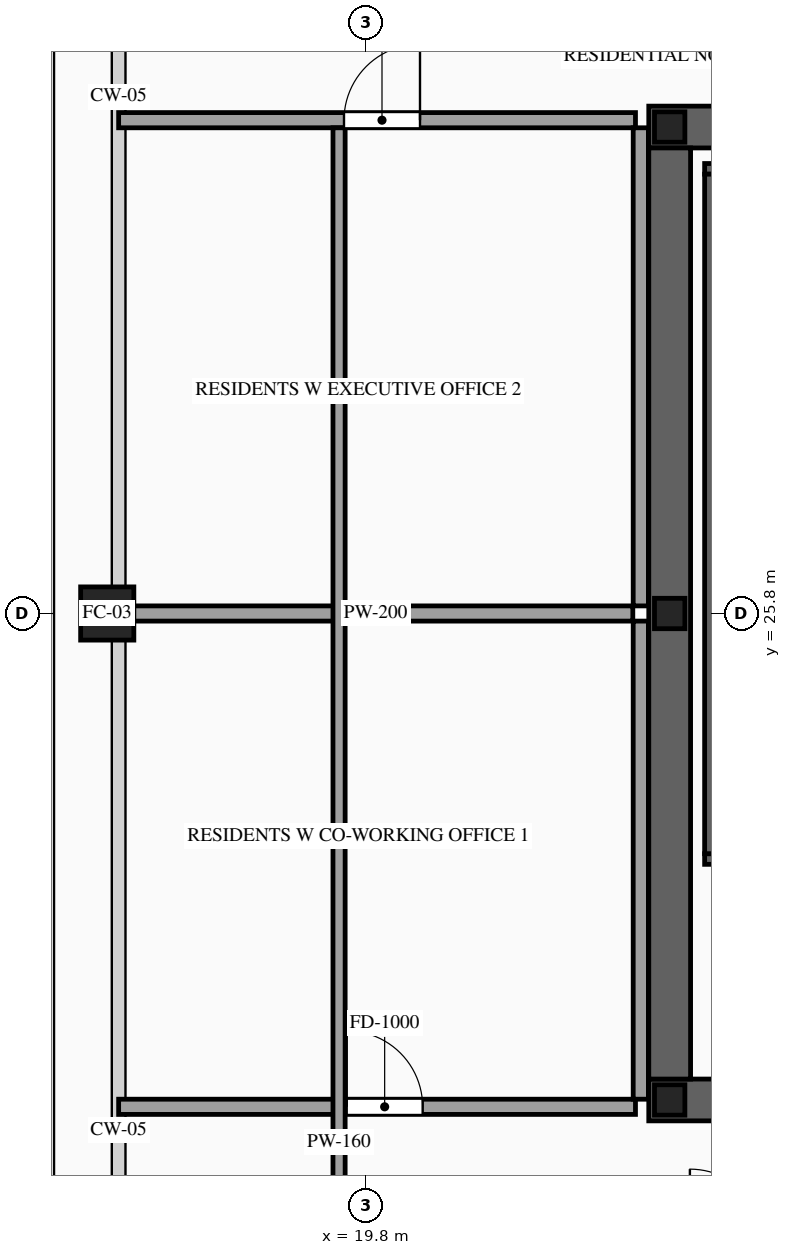
"""IFC4 building model, lengths in metres.
Left out: names, types, materials, properties, quantities, classifications, styles, units other than length and angle.
Written with IfcOpenShell. Run it as: python <this file> out.ifc"""

import sys

from ifc_helpers import new_model, si_unit, direction, frame, frame_2d, origin, origin_2d, place, context, subcontext, project, spatial, rectangle, hollow_rectangle, i_section, extrude, source, transform, mapped, element, fill, save


model = new_model("IFC4")
c1 = context("Model", 3, precision=1e-05, world=origin(), true_north=direction((0.0, 1.0)))
c2 = subcontext(c1, "Body", "Model", "MODEL_VIEW")
j1 = project(units=[si_unit("LENGTHUNIT", "METRE"), si_unit("PLANEANGLEUNIT", "RADIAN")], contexts=[c1])
p1 = place(None, origin())
s1 = spatial("IfcSite", under=j1, at=p1, CompositionType="ELEMENT")
p2 = place(p1, origin())
s2 = spatial("IfcBuilding", under=s1, at=p2, CompositionType="ELEMENT")
p3 = place(p2, frame((0.0, 0.0, 245.1)))
s3 = spatial("IfcBuildingStorey", under=s2, at=p3, CompositionType="ELEMENT", Elevation=245.1)
p4 = place(p3, frame((23.525, 19.4, 0.0), z_axis=(0.0, 0.0, 1.0), x_axis=(1.0, 0.0, 0.0)))
e1 = element("IfcWall", 1, at=p4, inside=s3, PredefinedType="SHEAR", context=c2, shape_type="SweptSolid", body=[
    extrude(rectangle(XDim=26.95, YDim=0.55, at=frame_2d((13.475, 0.0))), origin(), (0.0, 0.0, 1.0), 3.5),
])
p5 = place(p4, frame((1.925, 0.0, 0.0)))
e2 = element("IfcOpeningElement", 2, at=p5, cuts=e1, PredefinedType="OPENING", context=c2, shape_type="SweptSolid", body=[
    extrude(rectangle(XDim=1.1, YDim=2.2, at=frame_2d((0.55, 1.1))), frame((0.0, 0.29, 0.0), z_axis=(0.0, -1.0, 0.0), x_axis=(1.0, 0.0, 0.0)), (0.0, 0.0, 1.0), 0.58),
])
p6 = place(p4, frame((9.825, 0.0, 0.0)))
e3 = element("IfcOpeningElement", 3, at=p6, cuts=e1, PredefinedType="OPENING", context=c2, shape_type="SweptSolid", body=[
    extrude(rectangle(XDim=1.1, YDim=2.2, at=frame_2d((0.55, 1.1))), frame((0.0, 0.29, 0.0), z_axis=(0.0, -1.0, 0.0), x_axis=(1.0, 0.0, 0.0)), (0.0, 0.0, 1.0), 0.58),
])
p7 = place(p4, frame((23.025, 0.0, 0.0)))
e4 = element("IfcOpeningElement", 4, at=p7, cuts=e1, PredefinedType="OPENING", context=c2, shape_type="SweptSolid", body=[
    extrude(rectangle(XDim=1.1, YDim=2.2, at=frame_2d((0.55, 1.1))), frame((0.0, 0.29, 0.0), z_axis=(0.0, -1.0, 0.0), x_axis=(1.0, 0.0, 0.0)), (0.0, 0.0, 1.0), 0.58),
])
p8 = place(p4, frame((19.645, 0.0, 0.0)))
e5 = element("IfcOpeningElement", 5, at=p8, cuts=e1, PredefinedType="OPENING", context=c2, shape_type="SweptSolid", body=[
    extrude(rectangle(XDim=0.9, YDim=2.15, at=frame_2d((0.45, 1.075))), frame((0.0, 0.29, 0.0), z_axis=(0.0, -1.0, 0.0), x_axis=(1.0, 0.0, 0.0)), (0.0, 0.0, 1.0), 0.58),
])
p9 = place(p4, frame((18.205, 0.0, 0.0)))
e6 = element("IfcOpeningElement", 6, at=p9, cuts=e1, PredefinedType="OPENING", context=c2, shape_type="SweptSolid", body=[
    extrude(rectangle(XDim=0.9, YDim=2.15, at=frame_2d((0.45, 1.075))), frame((0.0, 0.29, 0.0), z_axis=(0.0, -1.0, 0.0), x_axis=(1.0, 0.0, 0.0)), (0.0, 0.0, 1.0), 0.58),
])
p10 = place(p3, frame((23.525, 32.2, 0.0), z_axis=(0.0, 0.0, 1.0), x_axis=(1.0, 0.0, 0.0)))
e7 = element("IfcWall", 7, at=p10, inside=s3, PredefinedType="SHEAR", context=c2, shape_type="SweptSolid", body=[
    extrude(rectangle(XDim=26.95, YDim=0.55, at=frame_2d((13.475, 0.0))), origin(), (0.0, 0.0, 1.0), 3.5),
])
p11 = place(p10, frame((4.545, 0.0, 0.0)))
e8 = element("IfcOpeningElement", 8, at=p11, cuts=e7, PredefinedType="OPENING", context=c2, shape_type="SweptSolid", body=[
    extrude(rectangle(XDim=0.9, YDim=2.15, at=frame_2d((0.45, 1.075))), frame((0.0, 0.29, 0.0), z_axis=(0.0, -1.0, 0.0), x_axis=(1.0, 0.0, 0.0)), (0.0, 0.0, 1.0), 0.58),
])
p12 = place(p10, frame((9.825, 0.0, 0.0)))
e9 = element("IfcOpeningElement", 9, at=p12, cuts=e7, PredefinedType="OPENING", context=c2, shape_type="SweptSolid", body=[
    extrude(rectangle(XDim=1.1, YDim=2.2, at=frame_2d((0.55, 1.1))), frame((0.0, 0.29, 0.0), z_axis=(0.0, -1.0, 0.0), x_axis=(1.0, 0.0, 0.0)), (0.0, 0.0, 1.0), 0.58),
])
p13 = place(p10, frame((15.675, 0.0, 0.0)))
e10 = element("IfcOpeningElement", 10, at=p13, cuts=e7, PredefinedType="OPENING", context=c2, shape_type="SweptSolid", body=[
    extrude(rectangle(XDim=1.1, YDim=2.2, at=frame_2d((0.55, 1.1))), frame((0.0, 0.29, 0.0), z_axis=(0.0, -1.0, 0.0), x_axis=(1.0, 0.0, 0.0)), (0.0, 0.0, 1.0), 0.58),
])
m1 = source(origin(), c2, "Body", "SweptSolid", [
    extrude(rectangle(XDim=12.25, YDim=0.55, at=frame_2d((6.125, 0.0))), origin(), (0.0, 0.0, 1.0), 3.5),
])
p14 = place(p3, frame((23.8, 19.675, 0.0), z_axis=(0.0, 0.0, 1.0), x_axis=(0.0, 1.0, 0.0)))
e11 = element("IfcWall", 11, at=p14, inside=s3, PredefinedType="SHEAR", context=c2, shape_type="MappedRepresentation", body=[
    mapped(m1, transform((0.0, 0.0, 0.0), scale=1.0)),
])
m2 = source(origin(), c2, "Body", "SweptSolid", [
    extrude(i_section(OverallWidth=0.4, OverallDepth=0.4, WebThickness=0.013, FlangeThickness=0.021, at=origin_2d()), origin(), (0.0, 0.0, 1.0), 3.5),
])
for number, where, z_axis, x_axis in (
    (12, (23.8, 19.4, 0.0), (0.0, 0.0, 1.0), (1.0, 0.0, 0.0)),
    (13, (23.8, 25.8, 0.0), (0.0, 0.0, 1.0), (1.0, 0.0, 0.0)),
    (14, (23.8, 32.2, 0.0), (0.0, 0.0, 1.0), (1.0, 0.0, 0.0)),
):
    element("IfcColumn", number, at=place(p3, frame(where, z_axis=z_axis, x_axis=x_axis)), inside=s3, PredefinedType="COLUMN", context=c2, shape_type="MappedRepresentation", body=[
        mapped(m2, transform((0.0, 0.0, 0.0), scale=1.0)),
    ])
m3 = source(origin(), c2, "Body", "SweptSolid", [
    extrude(hollow_rectangle(XDim=0.7, YDim=0.7, WallThickness=0.032, at=origin_2d()), origin(), (0.0, 0.0, 1.0), 3.5),
])
p15 = place(p3, frame((16.4, 25.8, 0.0), z_axis=(0.0, 0.0, 1.0), x_axis=(1.0, 0.0, 0.0)))
e15 = element("IfcColumn", 15, at=p15, inside=s3, PredefinedType="COLUMN", context=c2, shape_type="MappedRepresentation", body=[
    mapped(m3, transform((0.0, 0.0, 0.0), scale=1.0)),
])
p16 = place(p3, frame((24.26, 22.57, 0.0), z_axis=(0.0, 0.0, 1.0), x_axis=(1.0, 0.0, 0.0)))
e16 = element("IfcWall", 16, at=p16, inside=s3, PredefinedType="SOLIDWALL", context=c2, shape_type="SweptSolid", body=[
    extrude(rectangle(XDim=3.28, YDim=0.14, at=frame_2d((1.64, 0.0))), origin(), (0.0, 0.0, 1.0), 3.28),
])
p17 = place(p16, frame((1.09, 0.0, 0.0)))
e17 = element("IfcOpeningElement", 17, at=p17, cuts=e16, PredefinedType="OPENING", context=c2, shape_type="SweptSolid", body=[
    extrude(rectangle(XDim=1.1, YDim=2.2, at=frame_2d((0.55, 1.1))), frame((0.0, 0.085, 0.0), z_axis=(0.0, -1.0, 0.0), x_axis=(1.0, 0.0, 0.0)), (0.0, 0.0, 1.0), 0.17),
])
m4 = source(origin(), c2, "Body", "SweptSolid", [
    extrude(rectangle(XDim=3.28, YDim=0.14, at=frame_2d((1.64, 0.0))), origin(), (0.0, 0.0, 1.0), 3.28),
])
p18 = place(p3, frame((24.26, 31.65, 0.0), z_axis=(0.0, 0.0, 1.0), x_axis=(1.0, 0.0, 0.0)))
e18 = element("IfcWall", 18, at=p18, inside=s3, PredefinedType="SOLIDWALL", context=c2, shape_type="MappedRepresentation", body=[
    mapped(m4, transform((0.0, 0.0, 0.0), scale=1.0)),
])
m5 = source(origin(), c2, "Body", "SweptSolid", [
    extrude(rectangle(XDim=8.94, YDim=0.14, at=frame_2d((4.47, 0.0))), origin(), (0.0, 0.0, 1.0), 3.28),
])
p19 = place(p3, frame((24.33, 22.64, 0.0), z_axis=(0.0, 0.0, 1.0), x_axis=(0.0, 1.0, 0.0)))
e19 = element("IfcWall", 19, at=p19, inside=s3, PredefinedType="SOLIDWALL", context=c2, shape_type="MappedRepresentation", body=[
    mapped(m5, transform((0.0, 0.0, 0.0), scale=1.0)),
])
p20 = place(p3, frame((16.55, 19.31, 0.0), z_axis=(0.0, 0.0, 1.0), x_axis=(1.0, 0.0, 0.0)))
e20 = element("IfcWall", 20, at=p20, inside=s3, PredefinedType="PARTITIONING", context=c2, shape_type="SweptSolid", body=[
    extrude(rectangle(XDim=6.8, YDim=0.2, at=frame_2d((3.4, 0.0))), origin(), (0.0, 0.0, 1.0), 2.825),
])
p21 = place(p20, frame((3.0, 0.0, 0.0)))
e21 = element("IfcOpeningElement", 21, at=p21, cuts=e20, PredefinedType="OPENING", context=c2, shape_type="SweptSolid", body=[
    extrude(rectangle(XDim=1.0, YDim=2.2, at=frame_2d((0.5, 1.1))), frame((0.0, 0.115, 0.0), z_axis=(0.0, -1.0, 0.0), x_axis=(1.0, 0.0, 0.0)), (0.0, 0.0, 1.0), 0.23),
])
m6 = source(origin(), c2, "Body", "SweptSolid", [
    extrude(rectangle(XDim=6.765, YDim=0.2, at=frame_2d((3.382, 0.0))), origin(), (0.0, 0.0, 1.0), 2.787),
])
p22 = place(p3, frame((16.55, 25.8, 0.0), z_axis=(0.0, 0.0, 1.0), x_axis=(1.0, 0.0, 0.0)))
e22 = element("IfcWall", 22, at=p22, inside=s3, PredefinedType="PARTITIONING", context=c2, shape_type="MappedRepresentation", body=[
    mapped(m6, transform((0.0, 0.0, 0.0), scale=1.0)),
])
m7 = source(origin(), c2, "Body", "SweptSolid", [
    extrude(rectangle(XDim=6.29, YDim=0.2, at=frame_2d((3.145, 0.0))), origin(), (0.0, 0.0, 1.0), 3.28),
])
p23 = place(p3, frame((23.42, 19.41, 0.0), z_axis=(0.0, 0.0, 1.0), x_axis=(0.0, 1.0, 0.0)))
e23 = element("IfcWall", 23, at=p23, inside=s3, PredefinedType="PARTITIONING", context=c2, shape_type="MappedRepresentation", body=[
    mapped(m7, transform((0.0, 0.0, 0.0), scale=1.0)),
])
p24 = place(p3, frame((16.55, 32.29, 0.0), z_axis=(0.0, 0.0, 1.0), x_axis=(1.0, 0.0, 0.0)))
e24 = element("IfcWall", 24, at=p24, inside=s3, PredefinedType="PARTITIONING", context=c2, shape_type="SweptSolid", body=[
    extrude(rectangle(XDim=6.8, YDim=0.2, at=frame_2d((3.4, 0.0))), origin(), (0.0, 0.0, 1.0), 2.825),
])
p25 = place(p24, frame((2.965, 0.0, 0.0)))
e25 = element("IfcOpeningElement", 25, at=p25, cuts=e24, PredefinedType="OPENING", context=c2, shape_type="SweptSolid", body=[
    extrude(rectangle(XDim=1.0, YDim=2.2, at=frame_2d((0.5, 1.1))), frame((0.0, 0.115, 0.0), z_axis=(0.0, -1.0, 0.0), x_axis=(1.0, 0.0, 0.0)), (0.0, 0.0, 1.0), 0.23),
])
m8 = source(origin(), c2, "Body", "SweptSolid", [
    extrude(rectangle(XDim=26.69, YDim=0.16, at=frame_2d((13.345, 0.0))), origin(), (0.0, 0.0, 1.0), 3.28),
])
p26 = place(p3, frame((19.45, 5.5, 0.0), z_axis=(0.0, 0.0, 1.0), x_axis=(0.0, 1.0, 0.0)))
e26 = element("IfcWall", 26, at=p26, inside=s3, PredefinedType="PARTITIONING", context=c2, shape_type="MappedRepresentation", body=[
    mapped(m8, transform((0.0, 0.0, 0.0), scale=1.0)),
])
p27 = place(p3, frame((23.42, 25.9, 0.0), z_axis=(0.0, 0.0, 1.0), x_axis=(0.0, 1.0, 0.0)))
e27 = element("IfcWall", 27, at=p27, inside=s3, PredefinedType="PARTITIONING", context=c2, shape_type="MappedRepresentation", body=[
    mapped(m7, transform((0.0, 0.0, 0.0), scale=1.0)),
])
m9 = source(origin(), c2, "Body", "SweptSolid", [
    extrude(rectangle(XDim=1.0, YDim=2.2, at=frame_2d((0.5, 1.1))), frame((0.0, 0.025, 0.0), z_axis=(0.0, -1.0, 0.0), x_axis=(1.0, 0.0, 0.0)), (0.0, 0.0, 1.0), 0.05),
])
p28 = place(p21, origin())
e28 = element("IfcDoor", 28, at=p28, inside=s3, OperationType="SINGLE_SWING_LEFT", PredefinedType="DOOR", context=c2, shape_type="MappedRepresentation", body=[
    mapped(m9, transform((0.0, 0.0, 0.0), scale=1.0)),
])
fill(e21, e28)
p29 = place(p25, origin())
e29 = element("IfcDoor", 29, at=p29, inside=s3, OperationType="SINGLE_SWING_RIGHT", PredefinedType="DOOR", context=c2, shape_type="MappedRepresentation", body=[
    mapped(m9, transform((0.0, 0.0, 0.0), scale=1.0)),
])
fill(e25, e29)
save(model, sys.argv[1])
